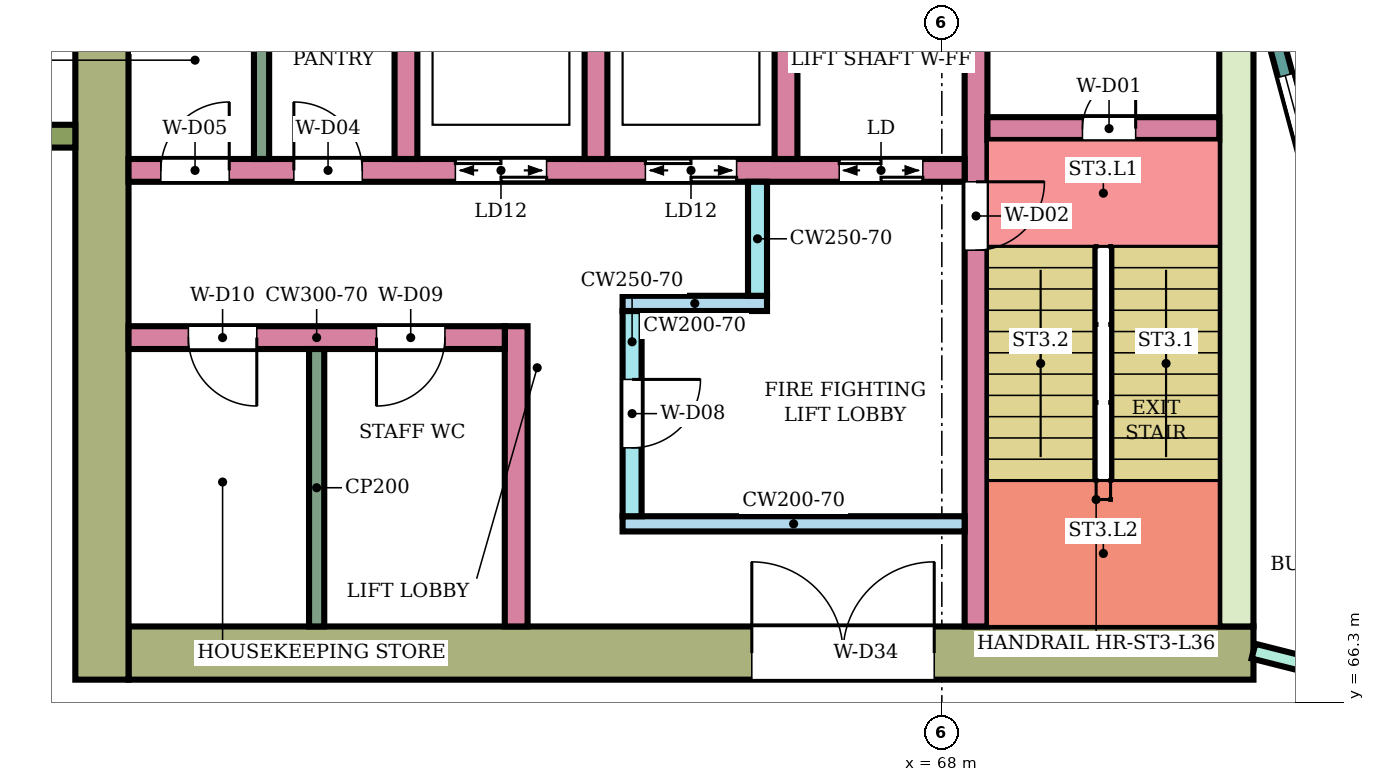
"""IFC4 building model, lengths in metres.
Left out: names, types, materials, properties, quantities, classifications, styles, units other than length and angle.
Written with IfcOpenShell. Run it as: python <this file> out.ifc"""

import sys

from ifc_helpers import new_model, si_unit, direction, frame, frame_2d, origin, place, context, subcontext, project, spatial, rectangle, extrude, element, fill, save


model = new_model("IFC4")
c1 = context("Model", 3, precision=1e-05, world=origin(), true_north=direction((0.0, 1.0)))
c2 = subcontext(c1, "Body", "Model", "MODEL_VIEW")
j1 = project(units=[si_unit("LENGTHUNIT", "METRE"), si_unit("PLANEANGLEUNIT", "RADIAN")], contexts=[c1])
p1 = place(None, origin())
s1 = spatial("IfcSite", under=j1, at=p1, CompositionType="ELEMENT")
p2 = place(p1, origin())
s2 = spatial("IfcBuilding", under=s1, at=p2, CompositionType="ELEMENT")
p3 = place(p2, frame((0.0, 0.0, 157.7)))
s3 = spatial("IfcBuildingStorey", under=s2, at=p3, CompositionType="ELEMENT", Elevation=157.7)
p4 = place(p3, frame((72.1, 66.95, 0.0), z_axis=(0.0, 0.0, 1.0), x_axis=(-1.0, 0.0, 0.0)))
e1 = element("IfcWall", 1, at=p4, inside=s3, PredefinedType="SHEAR", context=c2, shape_type="SweptSolid", body=[
    extrude(rectangle(XDim=14.8, YDim=0.7, at=frame_2d((7.4, 0.0))), origin(), (0.0, 0.0, 1.0), 3.78),
])
p5 = place(p4, frame((4.2, 0.0, 0.0)))
e2 = element("IfcOpeningElement", 2, at=p5, cuts=e1, PredefinedType="OPENING", context=c2, shape_type="SweptSolid", body=[
    extrude(rectangle(XDim=2.4, YDim=2.4, at=frame_2d((1.2, 1.2))), frame((0.0, 0.36, 0.0), z_axis=(0.0, -1.0, 0.0), x_axis=(1.0, 0.0, 0.0)), (0.0, 0.0, 1.0), 0.72),
])
p6 = place(p3, frame((71.875, 75.0, 0.0), z_axis=(0.0, 0.0, 1.0), x_axis=(0.0, -1.0, 0.0)))
e3 = element("IfcWall", 3, at=p6, inside=s3, PredefinedType="SHEAR", context=c2, shape_type="SweptSolid", body=[
    extrude(rectangle(XDim=7.7, YDim=0.45, at=frame_2d((3.85, 0.0))), origin(), (0.0, 0.0, 1.0), 3.78),
])
p7 = place(p3, frame((56.95, 83.4, 0.0), z_axis=(0.0, 0.0, 1.0), x_axis=(0.0, -1.0, 0.0)))
e4 = element("IfcWall", 4, at=p7, inside=s3, PredefinedType="SHEAR", context=c2, shape_type="SweptSolid", body=[
    extrude(rectangle(XDim=16.8, YDim=0.7, at=frame_2d((8.4, 0.0))), origin(), (0.0, 0.0, 1.0), 3.78),
])
p8 = place(p3, frame((68.45, 75.0, 0.0), z_axis=(0.0, 0.0, 1.0), x_axis=(0.0, -1.0, 0.0)))
e5 = element("IfcWall", 5, at=p8, inside=s3, PredefinedType="SHEAR", context=c2, shape_type="SweptSolid", body=[
    extrude(rectangle(XDim=7.7, YDim=0.3, at=frame_2d((3.85, 0.0))), origin(), (0.0, 0.0, 1.0), 3.78),
])
p9 = place(p8, frame((1.85, 0.0, 0.0)))
e6 = element("IfcOpeningElement", 6, at=p9, cuts=e5, PredefinedType="OPENING", context=c2, shape_type="SweptSolid", body=[
    extrude(rectangle(XDim=0.9, YDim=2.1, at=frame_2d((0.45, 1.05))), frame((0.0, 0.16, 0.0), z_axis=(0.0, -1.0, 0.0), x_axis=(1.0, 0.0, 0.0)), (0.0, 0.0, 1.0), 0.32),
])
p10 = place(p3, frame((71.65, 73.85, 0.0), z_axis=(0.0, 0.0, 1.0), x_axis=(-1.0, 0.0, 0.0)))
e7 = element("IfcWall", 7, at=p10, inside=s3, PredefinedType="SHEAR", context=c2, shape_type="SweptSolid", body=[
    extrude(rectangle(XDim=3.05, YDim=0.3, at=frame_2d((1.525, 0.0))), origin(), (0.0, 0.0, 1.0), 3.78),
])
p11 = place(p10, frame((1.1, 0.0, 0.0)))
e8 = element("IfcOpeningElement", 8, at=p11, cuts=e7, PredefinedType="OPENING", context=c2, shape_type="SweptSolid", body=[
    extrude(rectangle(XDim=0.7, YDim=2.0, at=frame_2d((0.35, 1.0))), frame((0.0, 0.16, 0.0), z_axis=(0.0, -1.0, 0.0), x_axis=(1.0, 0.0, 0.0)), (0.0, 0.0, 1.0), 0.32),
])
p12 = place(p3, frame((68.3, 73.3, 0.0), z_axis=(0.0, 0.0, 1.0), x_axis=(-1.0, 0.0, 0.0)))
e9 = element("IfcWall", 9, at=p12, inside=s3, PredefinedType="SHEAR", context=c2, shape_type="SweptSolid", body=[
    extrude(rectangle(XDim=11.0, YDim=0.3, at=frame_2d((5.5, 0.0))), origin(), (0.0, 0.0, 1.0), 3.78),
])
p13 = place(p12, frame((0.55, 0.0, 0.0)))
e10 = element("IfcOpeningElement", 10, at=p13, cuts=e9, PredefinedType="OPENING", context=c2, shape_type="SweptSolid", body=[
    extrude(rectangle(XDim=1.1, YDim=2.1, at=frame_2d((0.55, 1.05))), frame((0.0, 0.16, 0.0), z_axis=(0.0, -1.0, 0.0), x_axis=(1.0, 0.0, 0.0)), (0.0, 0.0, 1.0), 0.32),
])
p14 = place(p12, frame((3.0, 0.0, 0.0)))
e11 = element("IfcOpeningElement", 11, at=p14, cuts=e9, PredefinedType="OPENING", context=c2, shape_type="SweptSolid", body=[
    extrude(rectangle(XDim=1.2, YDim=2.1, at=frame_2d((0.6, 1.05))), frame((0.0, 0.16, 0.0), z_axis=(0.0, -1.0, 0.0), x_axis=(1.0, 0.0, 0.0)), (0.0, 0.0, 1.0), 0.32),
])
p15 = place(p12, frame((5.5, 0.0, 0.0)))
e12 = element("IfcOpeningElement", 12, at=p15, cuts=e9, PredefinedType="OPENING", context=c2, shape_type="SweptSolid", body=[
    extrude(rectangle(XDim=1.2, YDim=2.1, at=frame_2d((0.6, 1.05))), frame((0.0, 0.16, 0.0), z_axis=(0.0, -1.0, 0.0), x_axis=(1.0, 0.0, 0.0)), (0.0, 0.0, 1.0), 0.32),
])
p16 = place(p12, frame((7.925, 0.0, 0.0)))
e13 = element("IfcOpeningElement", 13, at=p16, cuts=e9, PredefinedType="OPENING", context=c2, shape_type="SweptSolid", body=[
    extrude(rectangle(XDim=0.9, YDim=2.1, at=frame_2d((0.45, 1.05))), frame((0.0, 0.16, 0.0), z_axis=(0.0, -1.0, 0.0), x_axis=(1.0, 0.0, 0.0)), (0.0, 0.0, 1.0), 0.32),
])
p17 = place(p12, frame((9.675, 0.0, 0.0)))
e14 = element("IfcOpeningElement", 14, at=p17, cuts=e9, PredefinedType="OPENING", context=c2, shape_type="SweptSolid", body=[
    extrude(rectangle(XDim=0.9, YDim=2.1, at=frame_2d((0.45, 1.05))), frame((0.0, 0.16, 0.0), z_axis=(0.0, -1.0, 0.0), x_axis=(1.0, 0.0, 0.0)), (0.0, 0.0, 1.0), 0.32),
])
for number, where, z_axis, x_axis in (
    (15, (65.95, 76.0, 0.0), (0.0, 0.0, 1.0), (0.0, -1.0, 0.0)),
    (16, (63.45, 76.0, 0.0), (0.0, 0.0, 1.0), (0.0, -1.0, 0.0)),
    (17, (60.95, 76.0, 0.0), (0.0, 0.0, 1.0), (0.0, -1.0, 0.0)),
):
    element("IfcWall", number, at=place(p3, frame(where, z_axis=z_axis, x_axis=x_axis)), inside=s3, PredefinedType="SHEAR", context=c2, shape_type="SweptSolid", body=[
        extrude(rectangle(XDim=2.55, YDim=0.3, at=frame_2d((1.275, 0.0))), origin(), (0.0, 0.0, 1.0), 3.78),
    ])
p18 = place(p3, frame((68.3, 68.65, 0.0), z_axis=(0.0, 0.0, 1.0), x_axis=(-1.0, 0.0, 0.0)))
e18 = element("IfcWall", 18, at=p18, inside=s3, PredefinedType="SHEAR", context=c2, shape_type="SweptSolid", body=[
    extrude(rectangle(XDim=4.5, YDim=0.2, at=frame_2d((2.25, 0.0))), origin(), (0.0, 0.0, 1.0), 3.78),
])
p19 = place(p3, frame((63.925, 71.45, 0.0), z_axis=(0.0, 0.0, 1.0), x_axis=(0.0, -1.0, 0.0)))
e19 = element("IfcWall", 19, at=p19, inside=s3, PredefinedType="SHEAR", context=c2, shape_type="SweptSolid", body=[
    extrude(rectangle(XDim=2.7, YDim=0.25, at=frame_2d((1.35, 0.0))), origin(), (0.0, 0.0, 1.0), 3.78),
])
p20 = place(p19, frame((0.9, 0.0, 0.0)))
e20 = element("IfcOpeningElement", 20, at=p20, cuts=e19, PredefinedType="OPENING", context=c2, shape_type="SweptSolid", body=[
    extrude(rectangle(XDim=0.9, YDim=2.1, at=frame_2d((0.45, 1.05))), frame((0.0, 0.135, 0.0), z_axis=(0.0, -1.0, 0.0), x_axis=(1.0, 0.0, 0.0)), (0.0, 0.0, 1.0), 0.27),
])
p21 = place(p3, frame((65.7, 71.55, 0.0), z_axis=(0.0, 0.0, 1.0), x_axis=(-1.0, 0.0, 0.0)))
e21 = element("IfcWall", 21, at=p21, inside=s3, PredefinedType="SHEAR", context=c2, shape_type="SweptSolid", body=[
    extrude(rectangle(XDim=1.9, YDim=0.2, at=frame_2d((0.95, 0.0))), origin(), (0.0, 0.0, 1.0), 3.78),
])
p22 = place(p3, frame((65.575, 73.15, 0.0), z_axis=(0.0, 0.0, 1.0), x_axis=(0.0, -1.0, 0.0)))
e22 = element("IfcWall", 22, at=p22, inside=s3, PredefinedType="SHEAR", context=c2, shape_type="SweptSolid", body=[
    extrude(rectangle(XDim=1.5, YDim=0.25, at=frame_2d((0.75, 0.0))), origin(), (0.0, 0.0, 1.0), 3.78),
])
p23 = place(p3, frame((62.4, 71.25, 0.0), z_axis=(0.0, 0.0, 1.0), x_axis=(0.0, -1.0, 0.0)))
e23 = element("IfcWall", 23, at=p23, inside=s3, PredefinedType="SHEAR", context=c2, shape_type="SweptSolid", body=[
    extrude(rectangle(XDim=3.95, YDim=0.3, at=frame_2d((1.975, 0.0))), origin(), (0.0, 0.0, 1.0), 3.78),
])
p24 = place(p3, frame((62.25, 71.1, 0.0), z_axis=(0.0, 0.0, 1.0), x_axis=(-1.0, 0.0, 0.0)))
e24 = element("IfcWall", 24, at=p24, inside=s3, PredefinedType="SHEAR", context=c2, shape_type="SweptSolid", body=[
    extrude(rectangle(XDim=4.95, YDim=0.3, at=frame_2d((2.475, 0.0))), origin(), (0.0, 0.0, 1.0), 3.78),
])
p25 = place(p24, frame((0.788, 0.0, 0.0)))
e25 = element("IfcOpeningElement", 25, at=p25, cuts=e24, PredefinedType="OPENING", context=c2, shape_type="SweptSolid", body=[
    extrude(rectangle(XDim=0.9, YDim=2.1, at=frame_2d((0.45, 1.05))), frame((0.0, 0.16, 0.0), z_axis=(0.0, -1.0, 0.0), x_axis=(1.0, 0.0, 0.0)), (0.0, 0.0, 1.0), 0.32),
])
p26 = place(p24, frame((3.262, 0.0, 0.0)))
e26 = element("IfcOpeningElement", 26, at=p26, cuts=e24, PredefinedType="OPENING", context=c2, shape_type="SweptSolid", body=[
    extrude(rectangle(XDim=0.9, YDim=2.1, at=frame_2d((0.45, 1.05))), frame((0.0, 0.16, 0.0), z_axis=(0.0, -1.0, 0.0), x_axis=(1.0, 0.0, 0.0)), (0.0, 0.0, 1.0), 0.32),
])
p27 = place(p3, frame((56.6, 73.75, 0.0), z_axis=(0.0, 0.0, 1.0), x_axis=(-1.0, 0.0, 0.0)))
e27 = element("IfcWall", 27, at=p27, inside=s3, PredefinedType="NOTDEFINED", context=c2, shape_type="SweptSolid", body=[
    extrude(rectangle(XDim=2.416, YDim=0.3, at=frame_2d((1.208, 0.0))), origin(), (0.0, 0.0, 1.0), 4.1),
])
p28 = place(p3, frame((72.396, 75.0, 0.0), z_axis=(0.0, 0.0, 1.0), x_axis=(0.258789828301, -0.965933654434, 0.0)))
e28 = element("IfcWall", 28, at=p28, inside=s3, PredefinedType="NOTDEFINED", context=c2, shape_type="SweptSolid", body=[
    extrude(rectangle(XDim=3.936, YDim=0.2, at=frame_2d((1.968, 0.0))), origin(), (0.0, 0.0, 1.0), 4.1),
])
p29 = place(p28, frame((0.468, 0.0, 0.9)))
e29 = element("IfcOpeningElement", 29, at=p29, cuts=e28, PredefinedType="OPENING", context=c2, shape_type="SweptSolid", body=[
    extrude(rectangle(XDim=3.0, YDim=2.3, at=frame_2d((1.5, 1.15))), frame((0.0, 0.11, 0.0), z_axis=(0.0, -1.0, 0.0), x_axis=(1.0, 0.0, 0.0)), (0.0, 0.0, 1.0), 0.22),
])
p30 = place(p3, frame((72.1, 66.975, 0.0), z_axis=(0.0, 0.0, 1.0), x_axis=(0.969471314457, -0.245204752086, 0.0)))
e30 = element("IfcWall", 30, at=p30, inside=s3, PredefinedType="PARTITIONING", context=c2, shape_type="SweptSolid", body=[
    extrude(rectangle(XDim=2.582, YDim=0.2, at=frame_2d((1.291, 0.0))), origin(), (0.0, 0.0, 1.0), 3.65),
])
p31 = place(p30, frame((0.841, 0.0, 0.0)))
e31 = element("IfcOpeningElement", 31, at=p31, cuts=e30, PredefinedType="OPENING", context=c2, shape_type="SweptSolid", body=[
    extrude(rectangle(XDim=0.9, YDim=2.1, at=frame_2d((0.45, 1.05))), frame((0.0, 0.11, 0.0), z_axis=(0.0, -1.0, 0.0), x_axis=(1.0, 0.0, 0.0)), (0.0, 0.0, 1.0), 0.22),
])
p32 = place(p3, frame((59.05, 76.0, 0.0), z_axis=(0.0, 0.0, 1.0), x_axis=(0.0, -1.0, 0.0)))
e32 = element("IfcWall", 32, at=p32, inside=s3, PredefinedType="PARTITIONING", context=c2, shape_type="SweptSolid", body=[
    extrude(rectangle(XDim=2.55, YDim=0.2, at=frame_2d((1.275, 0.0))), origin(), (0.0, 0.0, 1.0), 3.78),
])
p33 = place(p3, frame((59.775, 70.95, 0.0), z_axis=(0.0, 0.0, 1.0), x_axis=(0.0, -1.0, 0.0)))
e33 = element("IfcWall", 33, at=p33, inside=s3, PredefinedType="PARTITIONING", context=c2, shape_type="SweptSolid", body=[
    extrude(rectangle(XDim=3.65, YDim=0.2, at=frame_2d((1.825, 0.0))), origin(), (0.0, 0.0, 1.0), 3.78),
])
p34 = place(p29, origin())
e34 = element("IfcWindow", 34, at=p34, inside=s3, PartitioningType="SINGLE_PANEL", PredefinedType="WINDOW", context=c2, shape_type="SweptSolid", body=[
    extrude(rectangle(XDim=3.0, YDim=2.3, at=frame_2d((1.5, 1.15))), frame((0.0, 0.03, 0.0), z_axis=(0.0, -1.0, 0.0), x_axis=(1.0, 0.0, 0.0)), (0.0, 0.0, 1.0), 0.06),
])
fill(e29, e34)
p35 = place(p11, frame((0.7, 0.0, 0.0), z_axis=(0.0, 0.0, 1.0), x_axis=(-1.0, 0.0, 0.0)))
e35 = element("IfcDoor", 35, at=p35, inside=s3, OperationType="SINGLE_SWING_RIGHT", PredefinedType="DOOR", context=c2, shape_type="SweptSolid", body=[
    extrude(rectangle(XDim=0.7, YDim=2.0, at=frame_2d((0.35, 1.0))), frame((0.0, 0.025, 0.0), z_axis=(0.0, -1.0, 0.0), x_axis=(1.0, 0.0, 0.0)), (0.0, 0.0, 1.0), 0.05),
])
fill(e8, e35)
p36 = place(p9, origin())
e36 = element("IfcDoor", 36, at=p36, inside=s3, OperationType="SINGLE_SWING_LEFT", PredefinedType="DOOR", context=c2, shape_type="SweptSolid", body=[
    extrude(rectangle(XDim=0.9, YDim=2.1, at=frame_2d((0.45, 1.05))), frame((0.0, 0.025, 0.0), z_axis=(0.0, -1.0, 0.0), x_axis=(1.0, 0.0, 0.0)), (0.0, 0.0, 1.0), 0.05),
])
fill(e6, e36)
p37 = place(p13, origin())
e37 = element("IfcDoor", 37, at=p37, inside=s3, OperationType="DOUBLE_DOOR_SLIDING", PredefinedType="DOOR", context=c2, shape_type="SweptSolid", body=[
    extrude(rectangle(XDim=1.1, YDim=2.1, at=frame_2d((0.55, 1.05))), frame((0.0, 0.025, 0.0), z_axis=(0.0, -1.0, 0.0), x_axis=(1.0, 0.0, 0.0)), (0.0, 0.0, 1.0), 0.05),
])
fill(e10, e37)
p38 = place(p14, origin())
e38 = element("IfcDoor", 38, at=p38, inside=s3, OperationType="DOUBLE_DOOR_SLIDING", PredefinedType="DOOR", context=c2, shape_type="SweptSolid", body=[
    extrude(rectangle(XDim=1.2, YDim=2.1, at=frame_2d((0.6, 1.05))), frame((0.0, 0.025, 0.0), z_axis=(0.0, -1.0, 0.0), x_axis=(1.0, 0.0, 0.0)), (0.0, 0.0, 1.0), 0.05),
])
fill(e11, e38)
p39 = place(p15, origin())
e39 = element("IfcDoor", 39, at=p39, inside=s3, OperationType="DOUBLE_DOOR_SLIDING", PredefinedType="DOOR", context=c2, shape_type="SweptSolid", body=[
    extrude(rectangle(XDim=1.2, YDim=2.1, at=frame_2d((0.6, 1.05))), frame((0.0, 0.025, 0.0), z_axis=(0.0, -1.0, 0.0), x_axis=(1.0, 0.0, 0.0)), (0.0, 0.0, 1.0), 0.05),
])
fill(e12, e39)
p40 = place(p16, frame((0.9, 0.0, 0.0), z_axis=(0.0, 0.0, 1.0), x_axis=(-1.0, 0.0, 0.0)))
e40 = element("IfcDoor", 40, at=p40, inside=s3, OperationType="SINGLE_SWING_LEFT", PredefinedType="DOOR", context=c2, shape_type="SweptSolid", body=[
    extrude(rectangle(XDim=0.9, YDim=2.1, at=frame_2d((0.45, 1.05))), frame((0.0, 0.025, 0.0), z_axis=(0.0, -1.0, 0.0), x_axis=(1.0, 0.0, 0.0)), (0.0, 0.0, 1.0), 0.05),
])
fill(e13, e40)
p41 = place(p17, frame((0.9, 0.0, 0.0), z_axis=(0.0, 0.0, 1.0), x_axis=(-1.0, 0.0, 0.0)))
e41 = element("IfcDoor", 41, at=p41, inside=s3, OperationType="SINGLE_SWING_RIGHT", PredefinedType="DOOR", context=c2, shape_type="SweptSolid", body=[
    extrude(rectangle(XDim=0.9, YDim=2.1, at=frame_2d((0.45, 1.05))), frame((0.0, 0.025, 0.0), z_axis=(0.0, -1.0, 0.0), x_axis=(1.0, 0.0, 0.0)), (0.0, 0.0, 1.0), 0.05),
])
fill(e14, e41)
p42 = place(p20, origin())
e42 = element("IfcDoor", 42, at=p42, inside=s3, OperationType="SINGLE_SWING_LEFT", PredefinedType="DOOR", context=c2, shape_type="SweptSolid", body=[
    extrude(rectangle(XDim=0.9, YDim=2.1, at=frame_2d((0.45, 1.05))), frame((0.0, 0.025, 0.0), z_axis=(0.0, -1.0, 0.0), x_axis=(1.0, 0.0, 0.0)), (0.0, 0.0, 1.0), 0.05),
])
fill(e20, e42)
p43 = place(p25, origin())
e43 = element("IfcDoor", 43, at=p43, inside=s3, OperationType="SINGLE_SWING_RIGHT", PredefinedType="DOOR", context=c2, shape_type="SweptSolid", body=[
    extrude(rectangle(XDim=0.9, YDim=2.1, at=frame_2d((0.45, 1.05))), frame((0.0, 0.025, 0.0), z_axis=(0.0, -1.0, 0.0), x_axis=(1.0, 0.0, 0.0)), (0.0, 0.0, 1.0), 0.05),
])
fill(e25, e43)
p44 = place(p26, origin())
e44 = element("IfcDoor", 44, at=p44, inside=s3, OperationType="SINGLE_SWING_LEFT", PredefinedType="DOOR", context=c2, shape_type="SweptSolid", body=[
    extrude(rectangle(XDim=0.9, YDim=2.1, at=frame_2d((0.45, 1.05))), frame((0.0, 0.025, 0.0), z_axis=(0.0, -1.0, 0.0), x_axis=(1.0, 0.0, 0.0)), (0.0, 0.0, 1.0), 0.05),
])
fill(e26, e44)
p45 = place(p5, frame((2.4, 0.0, 0.0), z_axis=(0.0, 0.0, 1.0), x_axis=(-1.0, 0.0, 0.0)))
e45 = element("IfcDoor", 45, at=p45, inside=s3, OperationType="DOUBLE_DOOR_SINGLE_SWING", PredefinedType="DOOR", context=c2, shape_type="SweptSolid", body=[
    extrude(rectangle(XDim=2.4, YDim=2.4, at=frame_2d((1.2, 1.2))), frame((0.0, 0.025, 0.0), z_axis=(0.0, -1.0, 0.0), x_axis=(1.0, 0.0, 0.0)), (0.0, 0.0, 1.0), 0.05),
])
fill(e2, e45)
save(model, sys.argv[1])
